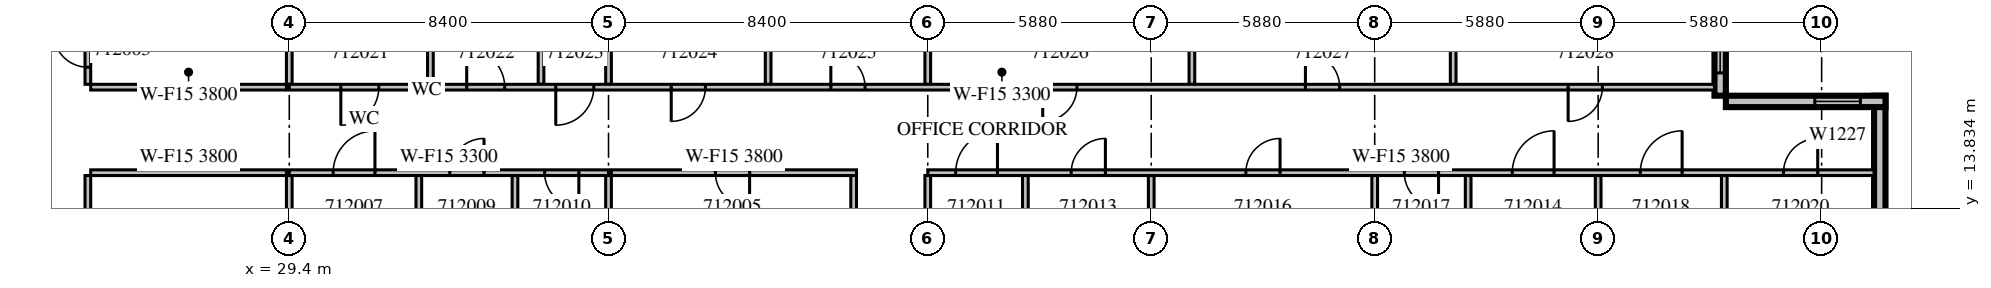
"""IFC4 building model, lengths in metres.
Left out: names, types, materials, properties, quantities, classifications, styles, units other than length and angle.
Written with IfcOpenShell. Run it as: python <this file> out.ifc"""

import sys

from ifc_helpers import new_model, si_unit, direction, frame, frame_2d, origin, place, context, subcontext, project, spatial, rectangle, extrude, source, transform, mapped, element, fill, save


model = new_model("IFC4")
c1 = context("Model", 3, precision=1e-05, world=origin(), true_north=direction((0.0, 1.0)))
c2 = subcontext(c1, "Body", "Model", "MODEL_VIEW")
j1 = project(units=[si_unit("LENGTHUNIT", "METRE"), si_unit("PLANEANGLEUNIT", "RADIAN")], contexts=[c1])
p1 = place(None, origin())
s1 = spatial("IfcSite", under=j1, at=p1, CompositionType="ELEMENT")
p2 = place(p1, origin())
s2 = spatial("IfcBuilding", under=s1, at=p2, CompositionType="ELEMENT")
p3 = place(p2, frame((0.0, 0.0, 61.5)))
s3 = spatial("IfcBuildingStorey", under=s2, at=p3, CompositionType="ELEMENT", Elevation=61.5)
m1 = source(origin(), c2, "Body", "SweptSolid", [
    extrude(rectangle(XDim=6.3, YDim=0.3, at=frame_2d((3.15, 0.0))), origin(), (0.0, 0.0, 1.0), 3.8),
])
p4 = place(p3, frame((71.25, 10.5, 0.0), z_axis=(0.0, 0.0, 1.0), x_axis=(0.0, 1.0, 0.0)))
e1 = element("IfcWall", 1, at=p4, inside=s3, PredefinedType="STANDARD", context=c2, shape_type="MappedRepresentation", body=[
    mapped(m1, transform((0.0, 0.0, 0.0), scale=1.0)),
])
m2 = source(origin(), c2, "Body", "SweptSolid", [
    extrude(rectangle(XDim=1.2, YDim=2.7, at=frame_2d((0.6, 1.35))), frame((0.0, 0.16, 0.0), z_axis=(0.0, -1.0, 0.0), x_axis=(1.0, 0.0, 0.0)), (0.0, 0.0, 1.0), 0.32),
])
p5 = place(p4, frame((1.062, 0.0, 0.6)))
e2 = element("IfcOpeningElement", 2, at=p5, cuts=e1, PredefinedType="OPENING", context=c2, shape_type="MappedRepresentation", body=[
    mapped(m2, transform((0.0, 0.0, 0.0), scale=1.0)),
])
m3 = source(origin(), c2, "Body", "SweptSolid", [
    extrude(rectangle(XDim=4.2, YDim=0.3, at=frame_2d((2.1, 0.0))), origin(), (0.0, 0.0, 1.0), 3.8),
])
p6 = place(p3, frame((71.4, 16.65, 0.0), z_axis=(0.0, 0.0, 1.0), x_axis=(-1.0, 0.0, 0.0)))
e3 = element("IfcWall", 3, at=p6, inside=s3, PredefinedType="STANDARD", context=c2, shape_type="MappedRepresentation", body=[
    mapped(m3, transform((0.0, 0.0, 0.0), scale=1.0)),
])
p7 = place(p6, frame((0.66, 0.0, 0.6)))
e4 = element("IfcOpeningElement", 4, at=p7, cuts=e3, PredefinedType="OPENING", context=c2, shape_type="MappedRepresentation", body=[
    mapped(m2, transform((0.0, 0.0, 0.0), scale=1.0)),
])
p8 = place(p3, frame((67.05, 16.8, 0.0), z_axis=(0.0, 0.0, 1.0), x_axis=(0.0, 1.0, 0.0)))
e5 = element("IfcWall", 5, at=p8, inside=s3, PredefinedType="STANDARD", context=c2, shape_type="MappedRepresentation", body=[
    mapped(m3, transform((0.0, 0.0, 0.0), scale=1.0)),
])
m4 = source(origin(), c2, "Body", "SweptSolid", [
    extrude(rectangle(XDim=3.0, YDim=2.7, at=frame_2d((1.5, 1.35))), frame((0.0, 0.16, 0.0), z_axis=(0.0, -1.0, 0.0), x_axis=(1.0, 0.0, 0.0)), (0.0, 0.0, 1.0), 0.32),
])
p9 = place(p8, frame((0.6, 0.0, 0.6)))
e6 = element("IfcOpeningElement", 6, at=p9, cuts=e5, PredefinedType="OPENING", context=c2, shape_type="MappedRepresentation", body=[
    mapped(m4, transform((0.0, 0.0, 0.0), scale=1.0)),
])
m5 = source(origin(), c2, "Body", "SweptSolid", [
    extrude(rectangle(XDim=11.625, YDim=0.15, at=frame_2d((5.812, 0.0))), origin(), (0.0, 0.0, 1.0), 2.8),
])
p10 = place(p3, frame((24.1, 14.7, 0.0), z_axis=(0.0, 0.0, 1.0), x_axis=(0.0, -1.0, 0.0)))
e7 = element("IfcWall", 7, at=p10, inside=s3, PredefinedType="PARTITIONING", context=c2, shape_type="MappedRepresentation", body=[
    mapped(m5, transform((0.0, 0.0, 0.0), scale=1.0)),
])
m6 = source(origin(), c2, "Body", "SweptSolid", [
    extrude(rectangle(XDim=0.9, YDim=2.1, at=frame_2d((0.45, 1.05))), frame((0.0, 0.085, 0.0), z_axis=(0.0, -1.0, 0.0), x_axis=(1.0, 0.0, 0.0)), (0.0, 0.0, 1.0), 0.17),
])
p11 = place(p10, frame((8.662, 0.0, 0.0)))
e8 = element("IfcOpeningElement", 8, at=p11, cuts=e7, PredefinedType="OPENING", context=c2, shape_type="MappedRepresentation", body=[
    mapped(m6, transform((0.0, 0.0, 0.0), scale=1.0)),
])
p12 = place(p10, frame((1.975, 0.0, 0.0)))
e9 = element("IfcOpeningElement", 9, at=p12, cuts=e7, PredefinedType="OPENING", context=c2, shape_type="MappedRepresentation", body=[
    mapped(m6, transform((0.0, 0.0, 0.0), scale=1.0)),
])
m7 = source(origin(), c2, "Body", "SweptSolid", [
    extrude(rectangle(XDim=3.6, YDim=0.15, at=frame_2d((1.8, 0.0))), origin(), (0.0, 0.0, 1.0), 3.8),
])
p13 = place(p3, frame((24.1, 20.7, 0.0), z_axis=(0.0, 0.0, 1.0), x_axis=(0.0, -1.0, 0.0)))
e10 = element("IfcWall", 10, at=p13, inside=s3, PredefinedType="PARTITIONING", context=c2, shape_type="MappedRepresentation", body=[
    mapped(m7, transform((0.0, 0.0, 0.0), scale=1.0)),
])
p14 = place(p13, frame((2.25, 0.0, 0.0)))
e11 = element("IfcOpeningElement", 11, at=p14, cuts=e10, PredefinedType="OPENING", context=c2, shape_type="MappedRepresentation", body=[
    mapped(m6, transform((0.0, 0.0, 0.0), scale=1.0)),
])
m8 = source(origin(), c2, "Body", "SweptSolid", [
    extrude(rectangle(XDim=5.15, YDim=0.15, at=frame_2d((2.575, 0.0))), origin(), (0.0, 0.0, 1.0), 3.8),
])
for number, where, z_axis, x_axis in (
    (12, (29.325, 14.775, 0.0), (0.0, 0.0, 1.0), (-1.0, 0.0, 0.0)),
    (13, (24.175, 17.025, 0.0), (0.0, 0.0, 1.0), (1.0, 0.0, 0.0)),
):
    element("IfcWall", number, at=place(p3, frame(where, z_axis=z_axis, x_axis=x_axis)), inside=s3, PredefinedType="PARTITIONING", context=c2, shape_type="MappedRepresentation", body=[
        mapped(m8, transform((0.0, 0.0, 0.0), scale=1.0)),
    ])
m9 = source(origin(), c2, "Body", "SweptSolid", [
    extrude(rectangle(XDim=3.601, YDim=0.15, at=frame_2d((1.8, 0.0))), origin(), (0.0, 0.0, 1.0), 3.8),
])
p15 = place(p3, frame((29.4, 11.099, 0.0), z_axis=(0.0, 0.0, 1.0), x_axis=(0.0, 1.0, 0.0)))
e14 = element("IfcWall", 14, at=p15, inside=s3, PredefinedType="PARTITIONING", context=c2, shape_type="MappedRepresentation", body=[
    mapped(m9, transform((0.0, 0.0, 0.0), scale=1.0)),
])
m10 = source(origin(), c2, "Body", "SweptSolid", [
    extrude(rectangle(XDim=2.701, YDim=0.15, at=frame_2d((1.351, 0.0))), origin(), (0.0, 0.0, 1.0), 3.8),
])
p16 = place(p3, frame((29.4, 17.1, 0.0), z_axis=(0.0, 0.0, 1.0), x_axis=(0.0, 1.0, 0.0)))
e15 = element("IfcWall", 15, at=p16, inside=s3, PredefinedType="PARTITIONING", context=c2, shape_type="MappedRepresentation", body=[
    mapped(m10, transform((0.0, 0.0, 0.0), scale=1.0)),
])
m11 = source(origin(), c2, "Body", "SweptSolid", [
    extrude(rectangle(XDim=2.875, YDim=0.15, at=frame_2d((1.438, 0.0))), origin(), (0.0, 0.0, 1.0), 3.8),
])
p17 = place(p3, frame((44.25, 11.9, 0.0), z_axis=(0.0, 0.0, 1.0), x_axis=(0.0, 1.0, 0.0)))
e16 = element("IfcWall", 16, at=p17, inside=s3, PredefinedType="PARTITIONING", context=c2, shape_type="MappedRepresentation", body=[
    mapped(m11, transform((0.0, 0.0, 0.0), scale=1.0)),
])
m12 = source(origin(), c2, "Body", "SweptSolid", [
    extrude(rectangle(XDim=6.45, YDim=0.15, at=frame_2d((3.225, 0.0))), origin(), (0.0, 0.0, 1.0), 3.8),
])
p18 = place(p3, frame((44.325, 14.775, 0.0), z_axis=(0.0, 0.0, 1.0), x_axis=(-1.0, 0.0, 0.0)))
e17 = element("IfcWall", 17, at=p18, inside=s3, PredefinedType="PARTITIONING", context=c2, shape_type="MappedRepresentation", body=[
    mapped(m12, transform((0.0, 0.0, 0.0), scale=1.0)),
])
p19 = place(p18, frame((2.812, 0.0, 0.0)))
e18 = element("IfcOpeningElement", 18, at=p19, cuts=e17, PredefinedType="OPENING", context=c2, shape_type="MappedRepresentation", body=[
    mapped(m6, transform((0.0, 0.0, 0.0), scale=1.0)),
])
m13 = source(origin(), c2, "Body", "SweptSolid", [
    extrude(rectangle(XDim=3.45, YDim=0.15, at=frame_2d((1.725, 0.0))), origin(), (0.0, 0.0, 1.0), 3.8),
])
for number, where, z_axis, x_axis in (
    (19, (32.809, 11.25, 0.0), (0.0, 0.0, 1.0), (0.0, 1.0, 0.0)),
    (20, (35.339, 11.25, 0.0), (0.0, 0.0, 1.0), (0.0, 1.0, 0.0)),
    (21, (37.8, 11.25, 0.0), (0.0, 0.0, 1.0), (0.0, 1.0, 0.0)),
    (22, (48.768, 11.25, 0.0), (0.0, 0.0, 1.0), (0.0, 1.0, 0.0)),
    (23, (57.96, 11.25, 0.0), (0.0, 0.0, 1.0), (0.0, 1.0, 0.0)),
    (24, (60.42, 11.25, 0.0), (0.0, 0.0, 1.0), (0.0, 1.0, 0.0)),
    (25, (67.158, 11.25, 0.0), (0.0, 0.0, 1.0), (0.0, 1.0, 0.0)),
    (26, (46.2, 11.25, 0.0), (0.0, 0.0, 1.0), (0.0, 1.0, 0.0)),
    (27, (52.08, 11.25, 0.0), (0.0, 0.0, 1.0), (0.0, 1.0, 0.0)),
    (28, (63.84, 11.25, 0.0), (0.0, 0.0, 1.0), (0.0, 1.0, 0.0)),
):
    element("IfcWall", number, at=place(p3, frame(where, z_axis=z_axis, x_axis=x_axis)), inside=s3, PredefinedType="PARTITIONING", context=c2, shape_type="MappedRepresentation", body=[
        mapped(m13, transform((0.0, 0.0, 0.0), scale=1.0)),
    ])
m14 = source(origin(), c2, "Body", "SweptSolid", [
    extrude(rectangle(XDim=3.6, YDim=0.15, at=frame_2d((1.8, 0.0))), origin(), (0.0, 0.0, 1.0), 2.8),
])
for number, where, z_axis, x_axis in (
    (29, (33.113, 20.7, 0.0), (0.0, 0.0, 1.0), (0.0, -1.0, 0.0)),
    (30, (36.024, 20.7, 0.0), (0.0, 0.0, 1.0), (0.0, -1.0, 0.0)),
):
    element("IfcWall", number, at=place(p3, frame(where, z_axis=z_axis, x_axis=x_axis)), inside=s3, PredefinedType="PARTITIONING", context=c2, shape_type="MappedRepresentation", body=[
        mapped(m14, transform((0.0, 0.0, 0.0), scale=1.0)),
    ])
for number, where, z_axis, x_axis in (
    (31, (42.0, 20.7, 0.0), (0.0, 0.0, 1.0), (0.0, -1.0, 0.0)),
    (32, (53.15, 20.7, 0.0), (0.0, 0.0, 1.0), (0.0, -1.0, 0.0)),
    (33, (60.025, 20.7, 0.0), (0.0, 0.0, 1.0), (0.0, -1.0, 0.0)),
):
    element("IfcWall", number, at=place(p3, frame(where, z_axis=z_axis, x_axis=x_axis)), inside=s3, PredefinedType="PARTITIONING", context=c2, shape_type="MappedRepresentation", body=[
        mapped(m7, transform((0.0, 0.0, 0.0), scale=1.0)),
    ])
for number, where, z_axis, x_axis in (
    (34, (37.8, 17.1, 0.0), (0.0, 0.0, 1.0), (0.0, 1.0, 0.0)),
    (35, (46.2, 17.1, 0.0), (0.0, 0.0, 1.0), (0.0, 1.0, 0.0)),
):
    element("IfcWall", number, at=place(p3, frame(where, z_axis=z_axis, x_axis=x_axis)), inside=s3, PredefinedType="PARTITIONING", context=c2, shape_type="MappedRepresentation", body=[
        mapped(m10, transform((0.0, 0.0, 0.0), scale=1.0)),
    ])
m15 = source(origin(), c2, "Body", "SweptSolid", [
    extrude(rectangle(XDim=8.4, YDim=0.15, at=frame_2d((4.2, 0.0))), origin(), (0.0, 0.0, 1.0), 3.3),
])
p20 = place(p3, frame((37.8, 14.775, 0.0), z_axis=(0.0, 0.0, 1.0), x_axis=(-1.0, 0.0, 0.0)))
e36 = element("IfcWall", 36, at=p20, inside=s3, PredefinedType="PARTITIONING", context=c2, shape_type="MappedRepresentation", body=[
    mapped(m15, transform((0.0, 0.0, 0.0), scale=1.0)),
])
m16 = source(origin(), c2, "Body", "SweptSolid", [
    extrude(rectangle(XDim=1.1, YDim=2.1, at=frame_2d((0.55, 1.05))), frame((0.0, 0.085, 0.0), z_axis=(0.0, -1.0, 0.0), x_axis=(1.0, 0.0, 0.0)), (0.0, 0.0, 1.0), 0.17),
])
p21 = place(p20, frame((6.146, 0.0, 0.0)))
e37 = element("IfcOpeningElement", 37, at=p21, cuts=e36, PredefinedType="OPENING", context=c2, shape_type="MappedRepresentation", body=[
    mapped(m16, transform((0.0, 0.0, 0.0), scale=1.0)),
])
p22 = place(p20, frame((3.276, 0.0, 0.0)))
e38 = element("IfcOpeningElement", 38, at=p22, cuts=e36, PredefinedType="OPENING", context=c2, shape_type="MappedRepresentation", body=[
    mapped(m6, transform((0.0, 0.0, 0.0), scale=1.0)),
])
p23 = place(p20, frame((0.781, 0.0, 0.0)))
e39 = element("IfcOpeningElement", 39, at=p23, cuts=e36, PredefinedType="OPENING", context=c2, shape_type="MappedRepresentation", body=[
    mapped(m6, transform((0.0, 0.0, 0.0), scale=1.0)),
])
m17 = source(origin(), c2, "Body", "SweptSolid", [
    extrude(rectangle(XDim=24.9, YDim=0.15, at=frame_2d((12.45, 0.0))), origin(), (0.0, 0.0, 1.0), 3.8),
])
p24 = place(p3, frame((71.1, 14.775, 0.0), z_axis=(0.0, 0.0, 1.0), x_axis=(-1.0, 0.0, 0.0)))
e40 = element("IfcWall", 40, at=p24, inside=s3, PredefinedType="PARTITIONING", context=c2, shape_type="MappedRepresentation", body=[
    mapped(m17, transform((0.0, 0.0, 0.0), scale=1.0)),
])
p25 = place(p24, frame((23.066, 0.0, 0.0)))
e41 = element("IfcOpeningElement", 41, at=p25, cuts=e40, PredefinedType="OPENING", context=c2, shape_type="MappedRepresentation", body=[
    mapped(m16, transform((0.0, 0.0, 0.0), scale=1.0)),
])
p26 = place(p24, frame((20.226, 0.0, 0.0)))
e42 = element("IfcOpeningElement", 42, at=p26, cuts=e40, PredefinedType="OPENING", context=c2, shape_type="MappedRepresentation", body=[
    mapped(m6, transform((0.0, 0.0, 0.0), scale=1.0)),
])
p27 = place(p24, frame((8.42, 0.0, 0.0)))
e43 = element("IfcOpeningElement", 43, at=p27, cuts=e40, PredefinedType="OPENING", context=c2, shape_type="MappedRepresentation", body=[
    mapped(m16, transform((0.0, 0.0, 0.0), scale=1.0)),
])
p28 = place(p24, frame((15.63, 0.0, 0.0)))
e44 = element("IfcOpeningElement", 44, at=p28, cuts=e40, PredefinedType="OPENING", context=c2, shape_type="MappedRepresentation", body=[
    mapped(m6, transform((0.0, 0.0, 0.0), scale=1.0)),
])
p29 = place(p24, frame((11.46, 0.0, 0.0)))
e45 = element("IfcOpeningElement", 45, at=p29, cuts=e40, PredefinedType="OPENING", context=c2, shape_type="MappedRepresentation", body=[
    mapped(m6, transform((0.0, 0.0, 0.0), scale=1.0)),
])
p30 = place(p24, frame((5.051, 0.0, 0.0)))
e46 = element("IfcOpeningElement", 46, at=p30, cuts=e40, PredefinedType="OPENING", context=c2, shape_type="MappedRepresentation", body=[
    mapped(m16, transform((0.0, 0.0, 0.0), scale=1.0)),
])
p31 = place(p24, frame((1.483, 0.0, 0.0)))
e47 = element("IfcOpeningElement", 47, at=p31, cuts=e40, PredefinedType="OPENING", context=c2, shape_type="MappedRepresentation", body=[
    mapped(m6, transform((0.0, 0.0, 0.0), scale=1.0)),
])
m18 = source(origin(), c2, "Body", "SweptSolid", [
    extrude(rectangle(XDim=37.5, YDim=0.15, at=frame_2d((18.75, 0.0))), origin(), (0.0, 0.0, 1.0), 3.3),
])
p32 = place(p3, frame((29.4, 17.025, 0.0), z_axis=(0.0, 0.0, 1.0), x_axis=(1.0, 0.0, 0.0)))
e48 = element("IfcWall", 48, at=p32, inside=s3, PredefinedType="PARTITIONING", context=c2, shape_type="MappedRepresentation", body=[
    mapped(m18, transform((0.0, 0.0, 0.0), scale=1.0)),
])
m19 = source(origin(), c2, "Body", "SweptSolid", [
    extrude(rectangle(XDim=1.0, YDim=2.1, at=frame_2d((0.5, 1.05))), frame((0.0, 0.085, 0.0), z_axis=(0.0, -1.0, 0.0), x_axis=(1.0, 0.0, 0.0)), (0.0, 0.0, 1.0), 0.17),
])
p33 = place(p32, frame((1.357, 0.0, 0.0)))
e49 = element("IfcOpeningElement", 49, at=p33, cuts=e48, PredefinedType="OPENING", context=c2, shape_type="MappedRepresentation", body=[
    mapped(m19, transform((0.0, 0.0, 0.0), scale=1.0)),
])
p34 = place(p32, frame((4.669, 0.0, 0.0)))
e50 = element("IfcOpeningElement", 50, at=p34, cuts=e48, PredefinedType="OPENING", context=c2, shape_type="MappedRepresentation", body=[
    mapped(m19, transform((0.0, 0.0, 0.0), scale=1.0)),
])
p35 = place(p32, frame((7.012, 0.0, 0.0)))
e51 = element("IfcOpeningElement", 51, at=p35, cuts=e48, PredefinedType="OPENING", context=c2, shape_type="MappedRepresentation", body=[
    mapped(m19, transform((0.0, 0.0, 0.0), scale=1.0)),
])
p36 = place(p32, frame((10.05, 0.0, 0.0)))
e52 = element("IfcOpeningElement", 52, at=p36, cuts=e48, PredefinedType="OPENING", context=c2, shape_type="MappedRepresentation", body=[
    mapped(m6, transform((0.0, 0.0, 0.0), scale=1.0)),
])
p37 = place(p32, frame((14.25, 0.0, 0.0)))
e53 = element("IfcOpeningElement", 53, at=p37, cuts=e48, PredefinedType="OPENING", context=c2, shape_type="MappedRepresentation", body=[
    mapped(m6, transform((0.0, 0.0, 0.0), scale=1.0)),
])
p38 = place(p32, frame((19.825, 0.0, 0.0)))
e54 = element("IfcOpeningElement", 54, at=p38, cuts=e48, PredefinedType="OPENING", context=c2, shape_type="MappedRepresentation", body=[
    mapped(m6, transform((0.0, 0.0, 0.0), scale=1.0)),
])
p39 = place(p32, frame((26.738, 0.0, 0.0)))
e55 = element("IfcOpeningElement", 55, at=p39, cuts=e48, PredefinedType="OPENING", context=c2, shape_type="MappedRepresentation", body=[
    mapped(m6, transform((0.0, 0.0, 0.0), scale=1.0)),
])
p40 = place(p32, frame((33.65, 0.0, 0.0)))
e56 = element("IfcOpeningElement", 56, at=p40, cuts=e48, PredefinedType="OPENING", context=c2, shape_type="MappedRepresentation", body=[
    mapped(m6, transform((0.0, 0.0, 0.0), scale=1.0)),
])
m20 = source(origin(), c2, "Body", "SweptSolid", [
    extrude(rectangle(XDim=1.2, YDim=2.7, at=frame_2d((0.6, 1.35))), frame((0.0, 0.03, 0.0), z_axis=(0.0, -1.0, 0.0), x_axis=(1.0, 0.0, 0.0)), (0.0, 0.0, 1.0), 0.06),
])
p41 = place(p7, origin())
e57 = element("IfcWindow", 57, at=p41, inside=s3, PartitioningType="SINGLE_PANEL", PredefinedType="WINDOW", context=c2, shape_type="MappedRepresentation", body=[
    mapped(m20, transform((0.0, 0.0, 0.0), scale=1.0)),
])
fill(e4, e57)
m21 = source(origin(), c2, "Body", "SweptSolid", [
    extrude(rectangle(XDim=3.0, YDim=2.7, at=frame_2d((1.5, 1.35))), frame((0.0, 0.03, 0.0), z_axis=(0.0, -1.0, 0.0), x_axis=(1.0, 0.0, 0.0)), (0.0, 0.0, 1.0), 0.06),
])
p42 = place(p9, origin())
e58 = element("IfcWindow", 58, at=p42, inside=s3, PartitioningType="SINGLE_PANEL", PredefinedType="WINDOW", context=c2, shape_type="MappedRepresentation", body=[
    mapped(m21, transform((0.0, 0.0, 0.0), scale=1.0)),
])
fill(e6, e58)
m22 = source(origin(), c2, "Body", "SweptSolid", [
    extrude(rectangle(XDim=0.9, YDim=2.1, at=frame_2d((0.45, 1.05))), frame((0.0, 0.025, 0.0), z_axis=(0.0, -1.0, 0.0), x_axis=(1.0, 0.0, 0.0)), (0.0, 0.0, 1.0), 0.05),
])
p43 = place(p14, origin())
e59 = element("IfcDoor", 59, at=p43, inside=s3, OperationType="SINGLE_SWING_RIGHT", PredefinedType="DOOR", context=c2, shape_type="MappedRepresentation", body=[
    mapped(m22, transform((0.0, 0.0, 0.0), scale=1.0)),
])
fill(e11, e59)
p44 = place(p19, origin())
e60 = element("IfcDoor", 60, at=p44, inside=s3, OperationType="SINGLE_SWING_LEFT", PredefinedType="DOOR", context=c2, shape_type="MappedRepresentation", body=[
    mapped(m22, transform((0.0, 0.0, 0.0), scale=1.0)),
])
fill(e18, e60)
m23 = source(origin(), c2, "Body", "SweptSolid", [
    extrude(rectangle(XDim=1.1, YDim=2.1, at=frame_2d((0.55, 1.05))), frame((0.0, 0.025, 0.0), z_axis=(0.0, -1.0, 0.0), x_axis=(1.0, 0.0, 0.0)), (0.0, 0.0, 1.0), 0.05),
])
p45 = place(p21, origin())
e61 = element("IfcDoor", 61, at=p45, inside=s3, OperationType="SINGLE_SWING_RIGHT", PredefinedType="DOOR", context=c2, shape_type="MappedRepresentation", body=[
    mapped(m23, transform((0.0, 0.0, 0.0), scale=1.0)),
])
fill(e37, e61)
p46 = place(p22, origin())
e62 = element("IfcDoor", 62, at=p46, inside=s3, OperationType="SINGLE_SWING_RIGHT", PredefinedType="DOOR", context=c2, shape_type="MappedRepresentation", body=[
    mapped(m22, transform((0.0, 0.0, 0.0), scale=1.0)),
])
fill(e38, e62)
p47 = place(p23, origin())
e63 = element("IfcDoor", 63, at=p47, inside=s3, OperationType="SINGLE_SWING_LEFT", PredefinedType="DOOR", context=c2, shape_type="MappedRepresentation", body=[
    mapped(m22, transform((0.0, 0.0, 0.0), scale=1.0)),
])
fill(e39, e63)
p48 = place(p25, origin())
e64 = element("IfcDoor", 64, at=p48, inside=s3, OperationType="SINGLE_SWING_RIGHT", PredefinedType="DOOR", context=c2, shape_type="MappedRepresentation", body=[
    mapped(m23, transform((0.0, 0.0, 0.0), scale=1.0)),
])
fill(e41, e64)
p49 = place(p26, origin())
e65 = element("IfcDoor", 65, at=p49, inside=s3, OperationType="SINGLE_SWING_RIGHT", PredefinedType="DOOR", context=c2, shape_type="MappedRepresentation", body=[
    mapped(m22, transform((0.0, 0.0, 0.0), scale=1.0)),
])
fill(e42, e65)
p50 = place(p27, origin())
e66 = element("IfcDoor", 66, at=p50, inside=s3, OperationType="SINGLE_SWING_RIGHT", PredefinedType="DOOR", context=c2, shape_type="MappedRepresentation", body=[
    mapped(m23, transform((0.0, 0.0, 0.0), scale=1.0)),
])
fill(e43, e66)
p51 = place(p28, origin())
e67 = element("IfcDoor", 67, at=p51, inside=s3, OperationType="SINGLE_SWING_RIGHT", PredefinedType="DOOR", context=c2, shape_type="MappedRepresentation", body=[
    mapped(m22, transform((0.0, 0.0, 0.0), scale=1.0)),
])
fill(e44, e67)
p52 = place(p29, origin())
e68 = element("IfcDoor", 68, at=p52, inside=s3, OperationType="SINGLE_SWING_LEFT", PredefinedType="DOOR", context=c2, shape_type="MappedRepresentation", body=[
    mapped(m22, transform((0.0, 0.0, 0.0), scale=1.0)),
])
fill(e45, e68)
p53 = place(p30, origin())
e69 = element("IfcDoor", 69, at=p53, inside=s3, OperationType="SINGLE_SWING_RIGHT", PredefinedType="DOOR", context=c2, shape_type="MappedRepresentation", body=[
    mapped(m23, transform((0.0, 0.0, 0.0), scale=1.0)),
])
fill(e46, e69)
p54 = place(p31, origin())
e70 = element("IfcDoor", 70, at=p54, inside=s3, OperationType="SINGLE_SWING_RIGHT", PredefinedType="DOOR", context=c2, shape_type="MappedRepresentation", body=[
    mapped(m22, transform((0.0, 0.0, 0.0), scale=1.0)),
])
fill(e47, e70)
m24 = source(origin(), c2, "Body", "SweptSolid", [
    extrude(rectangle(XDim=1.0, YDim=2.1, at=frame_2d((0.5, 1.05))), frame((0.0, 0.025, 0.0), z_axis=(0.0, -1.0, 0.0), x_axis=(1.0, 0.0, 0.0)), (0.0, 0.0, 1.0), 0.05),
])
p55 = place(p33, origin())
e71 = element("IfcDoor", 71, at=p55, inside=s3, OperationType="SINGLE_SWING_RIGHT", PredefinedType="DOOR", context=c2, shape_type="MappedRepresentation", body=[
    mapped(m24, transform((0.0, 0.0, 0.0), scale=1.0)),
])
fill(e49, e71)
p56 = place(p34, origin())
e72 = element("IfcDoor", 72, at=p56, inside=s3, OperationType="SINGLE_SWING_LEFT", PredefinedType="DOOR", context=c2, shape_type="MappedRepresentation", body=[
    mapped(m24, transform((0.0, 0.0, 0.0), scale=1.0)),
])
fill(e50, e72)
p57 = place(p35, origin())
e73 = element("IfcDoor", 73, at=p57, inside=s3, OperationType="SINGLE_SWING_RIGHT", PredefinedType="DOOR", context=c2, shape_type="MappedRepresentation", body=[
    mapped(m24, transform((0.0, 0.0, 0.0), scale=1.0)),
])
fill(e51, e73)
p58 = place(p36, origin())
e74 = element("IfcDoor", 74, at=p58, inside=s3, OperationType="SINGLE_SWING_RIGHT", PredefinedType="DOOR", context=c2, shape_type="MappedRepresentation", body=[
    mapped(m22, transform((0.0, 0.0, 0.0), scale=1.0)),
])
fill(e52, e74)
p59 = place(p37, origin())
e75 = element("IfcDoor", 75, at=p59, inside=s3, OperationType="SINGLE_SWING_LEFT", PredefinedType="DOOR", context=c2, shape_type="MappedRepresentation", body=[
    mapped(m22, transform((0.0, 0.0, 0.0), scale=1.0)),
])
fill(e53, e75)
p60 = place(p38, origin())
e76 = element("IfcDoor", 76, at=p60, inside=s3, OperationType="SINGLE_SWING_RIGHT", PredefinedType="DOOR", context=c2, shape_type="MappedRepresentation", body=[
    mapped(m22, transform((0.0, 0.0, 0.0), scale=1.0)),
])
fill(e54, e76)
p61 = place(p39, origin())
e77 = element("IfcDoor", 77, at=p61, inside=s3, OperationType="SINGLE_SWING_LEFT", PredefinedType="DOOR", context=c2, shape_type="MappedRepresentation", body=[
    mapped(m22, transform((0.0, 0.0, 0.0), scale=1.0)),
])
fill(e55, e77)
p62 = place(p40, origin())
e78 = element("IfcDoor", 78, at=p62, inside=s3, OperationType="SINGLE_SWING_RIGHT", PredefinedType="DOOR", context=c2, shape_type="MappedRepresentation", body=[
    mapped(m22, transform((0.0, 0.0, 0.0), scale=1.0)),
])
fill(e56, e78)
save(model, sys.argv[1])
